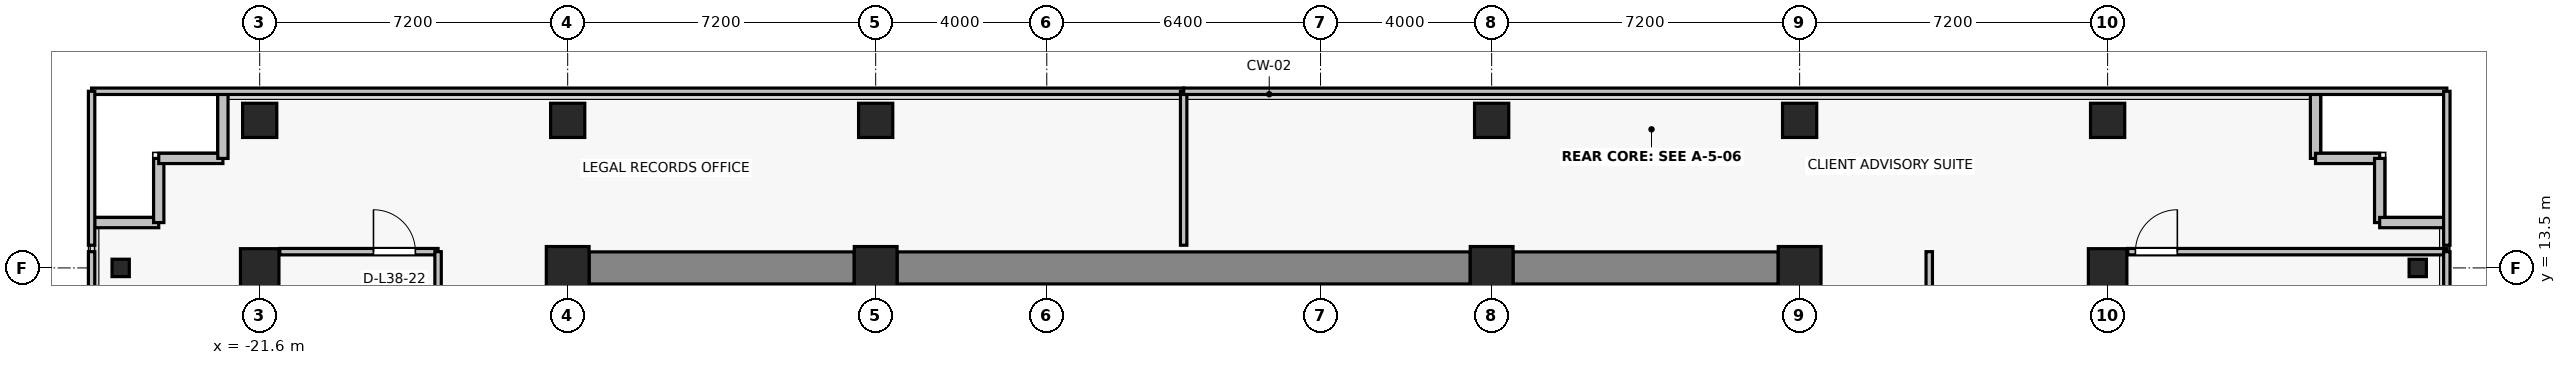
"""IFC4 building model, lengths in metres.
Left out: names, types, materials, properties, quantities, classifications, styles, units other than length and angle.
Written with IfcOpenShell. Run it as: python <this file> out.ifc"""

import sys

from ifc_helpers import new_model, si_unit, direction, frame, frame_2d, origin, origin_2d, place, context, subcontext, project, spatial, rectangle, i_section, extrude, source, transform, mapped, element, fill, save


model = new_model("IFC4")
c1 = context("Model", 3, precision=1e-05, world=origin(), true_north=direction((0.0, 1.0)))
c2 = subcontext(c1, "Body", "Model", "MODEL_VIEW")
j1 = project(units=[si_unit("LENGTHUNIT", "METRE"), si_unit("PLANEANGLEUNIT", "RADIAN")], contexts=[c1])
p1 = place(None, origin())
s1 = spatial("IfcSite", under=j1, at=p1, CompositionType="ELEMENT")
p2 = place(p1, origin())
s2 = spatial("IfcBuilding", under=s1, at=p2, CompositionType="ELEMENT")
p3 = place(p2, frame((0.0, 0.0, 136.3)))
s3 = spatial("IfcBuildingStorey", under=s2, at=p3, CompositionType="ELEMENT", Elevation=136.3)
for number, where, z_axis, x_axis in (
    (1, (-14.4, 13.5, 0.0), (0.0, 0.0, 1.0), (1.0, 0.0, 0.0)),
    (2, (-7.2, 13.5, 0.0), (0.0, 0.0, 1.0), (1.0, 0.0, 0.0)),
    (3, (7.2, 13.5, 0.0), (0.0, 0.0, 1.0), (1.0, 0.0, 0.0)),
    (4, (14.4, 13.5, 0.0), (0.0, 0.0, 1.0), (1.0, 0.0, 0.0)),
):
    element("IfcColumn", number, at=place(p3, frame(where, z_axis=z_axis, x_axis=x_axis)), inside=s3, PredefinedType="COLUMN", context=c2, shape_type="SweptSolid", body=[
        extrude(rectangle(XDim=1.0, YDim=1.0, at=origin_2d()), origin(), (0.0, 0.0, 1.0), 3.3),
    ])
for number, where, z_axis, x_axis in (
    (5, (-21.6, 13.5, 0.0), (0.0, 0.0, 1.0), (1.0, 0.0, 0.0)),
    (6, (21.6, 13.5, 0.0), (0.0, 0.0, 1.0), (1.0, 0.0, 0.0)),
):
    element("IfcColumn", number, at=place(p3, frame(where, z_axis=z_axis, x_axis=x_axis)), inside=s3, PredefinedType="COLUMN", context=c2, shape_type="SweptSolid", body=[
        extrude(rectangle(XDim=0.9, YDim=0.9, at=origin_2d()), origin(), (0.0, 0.0, 1.0), 3.3),
    ])
for number, where, z_axis, x_axis in (
    (7, (-14.4, 16.95, 0.0), (0.0, 0.0, 1.0), (1.0, 0.0, 0.0)),
    (8, (-7.2, 16.95, 0.0), (0.0, 0.0, 1.0), (1.0, 0.0, 0.0)),
    (9, (7.2, 16.95, 0.0), (0.0, 0.0, 1.0), (1.0, 0.0, 0.0)),
    (10, (14.4, 16.95, 0.0), (0.0, 0.0, 1.0), (1.0, 0.0, 0.0)),
    (11, (-21.6, 16.95, 0.0), (0.0, 0.0, 1.0), (1.0, 0.0, 0.0)),
    (12, (21.6, 16.95, 0.0), (0.0, 0.0, 1.0), (1.0, 0.0, 0.0)),
):
    element("IfcColumn", number, at=place(p3, frame(where, z_axis=z_axis, x_axis=x_axis)), inside=s3, PredefinedType="COLUMN", context=c2, shape_type="SweptSolid", body=[
        extrude(rectangle(XDim=0.8, YDim=0.8, at=origin_2d()), origin(), (0.0, 0.0, 1.0), 3.3),
    ])
for number, where, z_axis, x_axis in (
    (13, (-24.85, 13.5, 0.0), (0.0, 0.0, 1.0), (1.0, 0.0, 0.0)),
    (14, (28.85, 13.5, 0.0), (0.0, 0.0, 1.0), (1.0, 0.0, 0.0)),
):
    element("IfcColumn", number, at=place(p3, frame(where, z_axis=z_axis, x_axis=x_axis)), inside=s3, PredefinedType="COLUMN", context=c2, shape_type="SweptSolid", body=[
        extrude(i_section(OverallWidth=0.404, OverallDepth=0.407, WebThickness=0.022, FlangeThickness=0.032, FilletRadius=0.015, at=origin_2d()), origin(), (0.0, 0.0, 1.0), 3.3),
    ])
p4 = place(p3, frame((-13.9, 13.5, 0.0), z_axis=(0.0, 0.0, 1.0), x_axis=(1.0, 0.0, 0.0)))
e15 = element("IfcWall", 15, at=p4, inside=s3, PredefinedType="SHEAR", context=c2, shape_type="SweptSolid", body=[
    extrude(rectangle(XDim=6.2, YDim=0.75, at=frame_2d((3.1, 0.0))), origin(), (0.0, 0.0, 1.0), 3.05),
])
p5 = place(p3, frame((-6.7, 13.5, 0.0), z_axis=(0.0, 0.0, 1.0), x_axis=(1.0, 0.0, 0.0)))
e16 = element("IfcWall", 16, at=p5, inside=s3, PredefinedType="SHEAR", context=c2, shape_type="SweptSolid", body=[
    extrude(rectangle(XDim=13.4, YDim=0.75, at=frame_2d((6.7, 0.0))), origin(), (0.0, 0.0, 1.0), 3.05),
])
p6 = place(p3, frame((7.7, 13.5, 0.0), z_axis=(0.0, 0.0, 1.0), x_axis=(1.0, 0.0, 0.0)))
e17 = element("IfcWall", 17, at=p6, inside=s3, PredefinedType="SHEAR", context=c2, shape_type="SweptSolid", body=[
    extrude(rectangle(XDim=6.2, YDim=0.75, at=frame_2d((3.1, 0.0))), origin(), (0.0, 0.0, 1.0), 3.05),
])
for number, where, z_axis, x_axis in (
    (18, (-23.96, 14.56, 0.0), (0.0, 0.0, 1.0), (-1.0, 0.0, 0.0)),
    (19, (-23.96, 16.06, 0.0), (0.0, 0.0, 1.0), (0.0, -1.0, 0.0)),
    (20, (-22.46, 16.06, 0.0), (0.0, 0.0, 1.0), (-1.0, 0.0, 0.0)),
):
    element("IfcWall", number, at=place(p3, frame(where, z_axis=z_axis, x_axis=x_axis)), inside=s3, PredefinedType="SOLIDWALL", context=c2, shape_type="SweptSolid", body=[
        extrude(rectangle(XDim=1.5, YDim=0.24, at=frame_2d((0.75, 0.0))), origin(), (0.0, 0.0, 1.0), 3.05),
    ])
p7 = place(p3, frame((-22.46, 17.56, 0.0), z_axis=(0.0, 0.0, 1.0), x_axis=(0.0, -1.0, 0.0)))
e21 = element("IfcWall", 21, at=p7, inside=s3, PredefinedType="SOLIDWALL", context=c2, shape_type="SweptSolid", body=[
    extrude(rectangle(XDim=1.5, YDim=0.24, at=frame_2d((0.75, 0.0))), origin(), (0.0, 0.0, 1.0), 2.54),
])
for number, where, z_axis, x_axis in (
    (22, (26.46, 16.06, 0.0), (0.0, 0.0, 1.0), (0.0, 1.0, 0.0)),
    (23, (27.96, 16.06, 0.0), (0.0, 0.0, 1.0), (-1.0, 0.0, 0.0)),
    (24, (27.96, 14.56, 0.0), (0.0, 0.0, 1.0), (0.0, 1.0, 0.0)),
    (25, (29.46, 14.56, 0.0), (0.0, 0.0, 1.0), (-1.0, 0.0, 0.0)),
):
    element("IfcWall", number, at=place(p3, frame(where, z_axis=z_axis, x_axis=x_axis)), inside=s3, PredefinedType="SOLIDWALL", context=c2, shape_type="SweptSolid", body=[
        extrude(rectangle(XDim=1.5, YDim=0.24, at=frame_2d((0.75, 0.0))), origin(), (0.0, 0.0, 1.0), 3.05),
    ])
p8 = place(p3, frame((-21.13, 13.88, 0.0), z_axis=(0.0, 0.0, 1.0), x_axis=(1.0, 0.0, 0.0)))
e26 = element("IfcWall", 26, at=p8, inside=s3, PredefinedType="PARTITIONING", context=c2, shape_type="SweptSolid", body=[
    extrude(rectangle(XDim=3.7, YDim=0.15, at=frame_2d((1.85, 0.0))), origin(), (0.0, 0.0, 1.0), 3.05),
])
p9 = place(p8, frame((2.19, 0.0, 0.0)))
e27 = element("IfcOpeningElement", 27, at=p9, cuts=e26, PredefinedType="OPENING", context=c2, shape_type="SweptSolid", body=[
    extrude(rectangle(XDim=0.98, YDim=2.15, at=frame_2d((0.49, 1.075))), frame((0.0, 0.085, 0.0), z_axis=(0.0, -1.0, 0.0), x_axis=(1.0, 0.0, 0.0)), (0.0, 0.0, 1.0), 0.17),
])
p10 = place(p3, frame((-25.53, -1.77, 0.0), z_axis=(0.0, 0.0, 1.0), x_axis=(0.0, 1.0, 0.0)))
e28 = element("IfcWall", 28, at=p10, inside=s3, PredefinedType="PARTITIONING", context=c2, shape_type="SweptSolid", body=[
    extrude(rectangle(XDim=15.65, YDim=0.15, at=frame_2d((7.825, 0.0))), origin(), (0.0, 0.0, 1.0), 3.05),
])
p11 = place(p3, frame((-17.43, 13.88, 0.0), z_axis=(0.0, 0.0, 1.0), x_axis=(0.0, -1.0, 0.0)))
e29 = element("IfcWall", 29, at=p11, inside=s3, PredefinedType="PARTITIONING", context=c2, shape_type="SweptSolid", body=[
    extrude(rectangle(XDim=15.65, YDim=0.15, at=frame_2d((7.825, 0.0))), origin(), (0.0, 0.0, 1.0), 2.49),
])
p12 = place(p11, frame((7.335, 0.0, 0.0)))
e30 = element("IfcOpeningElement", 30, at=p12, cuts=e29, PredefinedType="OPENING", context=c2, shape_type="SweptSolid", body=[
    extrude(rectangle(XDim=0.98, YDim=2.15, at=frame_2d((0.49, 1.075))), frame((0.0, 0.085, 0.0), z_axis=(0.0, -1.0, 0.0), x_axis=(1.0, 0.0, 0.0)), (0.0, 0.0, 1.0), 0.17),
])
p13 = place(p3, frame((22.07, 13.88, 0.0), z_axis=(0.0, 0.0, 1.0), x_axis=(1.0, 0.0, 0.0)))
e31 = element("IfcWall", 31, at=p13, inside=s3, PredefinedType="PARTITIONING", context=c2, shape_type="SweptSolid", body=[
    extrude(rectangle(XDim=7.46, YDim=0.15, at=frame_2d((3.73, 0.0))), origin(), (0.0, 0.0, 1.0), 3.05),
])
p14 = place(p13, frame((0.18, 0.0, 0.0)))
e32 = element("IfcOpeningElement", 32, at=p14, cuts=e31, PredefinedType="OPENING", context=c2, shape_type="SweptSolid", body=[
    extrude(rectangle(XDim=0.98, YDim=2.15, at=frame_2d((0.49, 1.075))), frame((0.0, 0.085, 0.0), z_axis=(0.0, -1.0, 0.0), x_axis=(1.0, 0.0, 0.0)), (0.0, 0.0, 1.0), 0.17),
])
p15 = place(p3, frame((17.43, 8.061, 0.0), z_axis=(0.0, 0.0, 1.0), x_axis=(0.0, 1.0, 0.0)))
e33 = element("IfcWall", 33, at=p15, inside=s3, PredefinedType="PARTITIONING", context=c2, shape_type="SweptSolid", body=[
    extrude(rectangle(XDim=5.819, YDim=0.15, at=frame_2d((2.91, 0.0))), origin(), (0.0, 0.0, 1.0), 2.49),
])
p16 = place(p15, frame((2.419, 0.0, 0.0)))
e34 = element("IfcOpeningElement", 34, at=p16, cuts=e33, PredefinedType="OPENING", context=c2, shape_type="SweptSolid", body=[
    extrude(rectangle(XDim=0.98, YDim=2.15, at=frame_2d((0.49, 1.075))), frame((0.0, 0.085, 0.0), z_axis=(0.0, -1.0, 0.0), x_axis=(1.0, 0.0, 0.0)), (0.0, 0.0, 1.0), 0.17),
])
p17 = place(p3, frame((29.53, 13.88, 0.0), z_axis=(0.0, 0.0, 1.0), x_axis=(0.0, -1.0, 0.0)))
e35 = element("IfcWall", 35, at=p17, inside=s3, PredefinedType="PARTITIONING", context=c2, shape_type="SweptSolid", body=[
    extrude(rectangle(XDim=5.819, YDim=0.15, at=frame_2d((2.91, 0.0))), origin(), (0.0, 0.0, 1.0), 3.05),
])
p18 = place(p3, frame((-25.53, 17.63, 0.0), z_axis=(0.0, 0.0, 1.0), x_axis=(1.0, 0.0, 0.0)))
e36 = element("IfcWall", 36, at=p18, inside=s3, PredefinedType="PARTITIONING", context=c2, shape_type="SweptSolid", body=[
    extrude(rectangle(XDim=25.53, YDim=0.15, at=frame_2d((12.765, 0.0))), origin(), (0.0, 0.0, 1.0), 3.05),
])
p19 = place(p3, frame((-25.53, 14.03, 0.0), z_axis=(0.0, 0.0, 1.0), x_axis=(0.0, 1.0, 0.0)))
e37 = element("IfcWall", 37, at=p19, inside=s3, PredefinedType="PARTITIONING", context=c2, shape_type="SweptSolid", body=[
    extrude(rectangle(XDim=3.6, YDim=0.15, at=frame_2d((1.8, 0.0))), origin(), (0.0, 0.0, 1.0), 3.05),
])
p20 = place(p3, frame((0.0, 17.63, 0.0), z_axis=(0.0, 0.0, 1.0), x_axis=(0.0, -1.0, 0.0)))
e38 = element("IfcWall", 38, at=p20, inside=s3, PredefinedType="PARTITIONING", context=c2, shape_type="SweptSolid", body=[
    extrude(rectangle(XDim=3.6, YDim=0.15, at=frame_2d((1.8, 0.0))), origin(), (0.0, 0.0, 1.0), 2.54),
])
p21 = place(p3, frame((0.0, 17.63, 0.0), z_axis=(0.0, 0.0, 1.0), x_axis=(1.0, 0.0, 0.0)))
e39 = element("IfcWall", 39, at=p21, inside=s3, PredefinedType="PARTITIONING", context=c2, shape_type="SweptSolid", body=[
    extrude(rectangle(XDim=29.53, YDim=0.15, at=frame_2d((14.765, 0.0))), origin(), (0.0, 0.0, 1.0), 3.05),
])
p22 = place(p3, frame((29.53, 17.63, 0.0), z_axis=(0.0, 0.0, 1.0), x_axis=(0.0, -1.0, 0.0)))
e40 = element("IfcWall", 40, at=p22, inside=s3, PredefinedType="PARTITIONING", context=c2, shape_type="SweptSolid", body=[
    extrude(rectangle(XDim=3.6, YDim=0.15, at=frame_2d((1.8, 0.0))), origin(), (0.0, 0.0, 1.0), 3.05),
])
m1 = source(origin(), c2, "Body", "SweptSolid", [
    extrude(rectangle(XDim=0.98, YDim=2.15, at=frame_2d((0.49, 1.075))), frame((0.0, 0.025, 0.0), z_axis=(0.0, -1.0, 0.0), x_axis=(1.0, 0.0, 0.0)), (0.0, 0.0, 1.0), 0.05),
])
p23 = place(p9, origin())
e41 = element("IfcDoor", 41, at=p23, inside=s3, OperationType="SINGLE_SWING_LEFT", PredefinedType="DOOR", context=c2, shape_type="MappedRepresentation", body=[
    mapped(m1, transform((0.0, 0.0, 0.0), x_axis=(1.0, 0.0, 0.0), y_axis=(0.0, 1.0, 0.0), z_axis=(0.0, 0.0, 1.0), scale=1.0)),
])
fill(e27, e41)
p24 = place(p14, origin())
e42 = element("IfcDoor", 42, at=p24, inside=s3, OperationType="SINGLE_SWING_RIGHT", PredefinedType="DOOR", context=c2, shape_type="MappedRepresentation", body=[
    mapped(m1, transform((0.0, 0.0, 0.0), x_axis=(1.0, 0.0, 0.0), y_axis=(0.0, 1.0, 0.0), z_axis=(0.0, 0.0, 1.0), scale=1.0)),
])
fill(e32, e42)
save(model, sys.argv[1])
